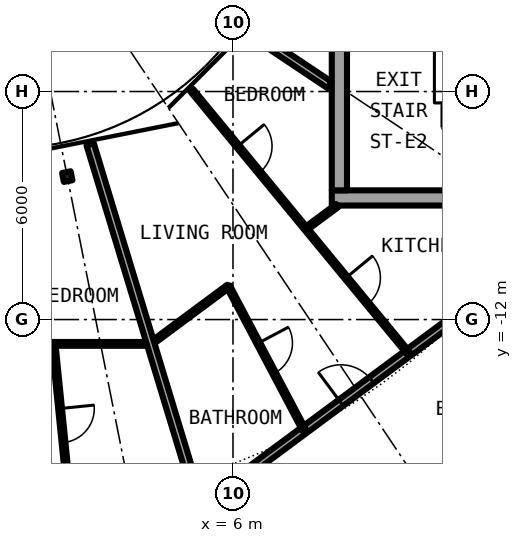
"""IFC4 building model, lengths in metres.
Left out: names, types, materials, properties, quantities, classifications, styles, units other than length and angle.
Written with IfcOpenShell. Run it as: python <this file> out.ifc"""

import sys

from ifc_helpers import new_model, si_unit, direction, frame, frame_2d, origin, origin_2d, place, context, subcontext, project, spatial, rectangle, i_section, extrude, element, fill, save


model = new_model("IFC4")
c1 = context("Model", 3, precision=1e-05, world=origin(), true_north=direction((0.0, 1.0)))
c2 = subcontext(c1, "Body", "Model", "MODEL_VIEW")
j1 = project(units=[si_unit("LENGTHUNIT", "METRE"), si_unit("PLANEANGLEUNIT", "RADIAN")], contexts=[c1])
p1 = place(None, origin())
s1 = spatial("IfcSite", under=j1, at=p1, CompositionType="ELEMENT")
p2 = place(p1, origin())
s2 = spatial("IfcBuilding", under=s1, at=p2, CompositionType="ELEMENT")
p3 = place(p2, frame((0.0, 0.0, 227.95)))
s3 = spatial("IfcBuildingStorey", under=s2, at=p3, CompositionType="ELEMENT", Elevation=227.95)
p4 = place(p3, frame((1.639, -8.239, 0.0), z_axis=(0.0, 0.0, 1.0), x_axis=(0.195090322016, -0.980785280403, 0.0)))
e1 = element("IfcColumn", 1, at=p4, inside=s3, PredefinedType="COLUMN", context=c2, shape_type="SweptSolid", body=[
    extrude(i_section(OverallWidth=0.24, OverallDepth=0.23, WebThickness=0.008, FlangeThickness=0.012, FilletRadius=0.021, at=origin_2d()), origin(), (0.0, 0.0, 1.0), 3.05),
])
p5 = place(p3, frame((8.6, -8.8, 0.0), z_axis=(0.0, 0.0, 1.0), x_axis=(1.0, 0.0, 0.0)))
e2 = element("IfcWall", 2, at=p5, inside=s3, PredefinedType="SHEAR", context=c2, shape_type="SweptSolid", body=[
    extrude(rectangle(XDim=13.4, YDim=0.4, at=frame_2d((6.7, 0.0))), origin(), (0.0, 0.0, 1.0), 3.05),
])
p6 = place(p5, frame((11.275, 0.0, 0.0)))
e3 = element("IfcOpeningElement", 3, at=p6, cuts=e2, PredefinedType="OPENING", context=c2, shape_type="SweptSolid", body=[
    extrude(rectangle(XDim=1.2, YDim=2.3, at=frame_2d((0.6, 1.15))), frame((0.0, 0.21, 0.0), z_axis=(0.0, -1.0, 0.0), x_axis=(1.0, 0.0, 0.0)), (0.0, 0.0, 1.0), 0.42),
])
p7 = place(p3, frame((8.8, -8.6, 0.0), z_axis=(0.0, 0.0, 1.0), x_axis=(0.0, 1.0, 0.0)))
e4 = element("IfcWall", 4, at=p7, inside=s3, PredefinedType="SHEAR", context=c2, shape_type="SweptSolid", body=[
    extrude(rectangle(XDim=17.2, YDim=0.4, at=frame_2d((8.6, 0.0))), origin(), (0.0, 0.0, 1.0), 3.05),
])
p8 = place(p7, frame((7.4, 0.0, 0.1)))
e5 = element("IfcOpeningElement", 5, at=p8, cuts=e4, PredefinedType="OPENING", context=c2, shape_type="SweptSolid", body=[
    extrude(rectangle(XDim=2.4, YDim=2.2, at=frame_2d((1.2, 1.1))), frame((0.0, 0.21, 0.0), z_axis=(0.0, -1.0, 0.0), x_axis=(1.0, 0.0, 0.0)), (0.0, 0.0, 1.0), 0.42),
])
p9 = place(p3, frame((10.512, -19.667, 0.0), z_axis=(0.0, 0.0, 1.0), x_axis=(0.740947367223, 0.671563101283, 0.0)))
e6 = element("IfcWall", 6, at=p9, inside=s3, PredefinedType="PARTITIONING", context=c2, shape_type="SweptSolid", body=[
    extrude(rectangle(XDim=10.837, YDim=0.2, at=frame_2d((5.419, 0.0))), origin(), (0.0, 0.0, 1.0), 2.7),
])
p10 = place(p9, frame((3.835, 0.0, 0.0)))
e7 = element("IfcOpeningElement", 7, at=p10, cuts=e6, PredefinedType="OPENING", context=c2, shape_type="SweptSolid", body=[
    extrude(rectangle(XDim=1.0, YDim=2.3, at=frame_2d((0.5, 1.15))), frame((0.0, 0.11, 0.0), z_axis=(0.0, -1.0, 0.0), x_axis=(1.0, 0.0, 0.0)), (0.0, 0.0, 1.0), 0.22),
])
p11 = place(p3, frame((5.137, -16.938, 0.0), z_axis=(0.0, 0.0, 1.0), x_axis=(0.803240181354, 0.595655278712, 0.0)))
e8 = element("IfcWall", 8, at=p11, inside=s3, PredefinedType="PARTITIONING", context=c2, shape_type="SweptSolid", body=[
    extrude(rectangle(XDim=11.928, YDim=0.2, at=frame_2d((5.964, 0.0))), origin(), (0.0, 0.0, 1.0), 2.7),
])
p12 = place(p11, frame((4.612, 0.0, 0.0)))
e9 = element("IfcOpeningElement", 9, at=p12, cuts=e8, PredefinedType="OPENING", context=c2, shape_type="SweptSolid", body=[
    extrude(rectangle(XDim=1.0, YDim=2.3, at=frame_2d((0.5, 1.15))), frame((0.0, 0.11, 0.0), z_axis=(0.0, -1.0, 0.0), x_axis=(1.0, 0.0, 0.0)), (0.0, 0.0, 1.0), 0.22),
])
p13 = place(p3, frame((0.0, -12.64, 0.0), z_axis=(0.0, 0.0, 1.0), x_axis=(1.0, 0.0, 0.0)))
e10 = element("IfcWall", 10, at=p13, inside=s3, PredefinedType="PARTITIONING", context=c2, shape_type="SweptSolid", body=[
    extrude(rectangle(XDim=3.834, YDim=0.1, at=frame_2d((1.917, 0.0))), origin(), (0.0, 0.0, 1.0), 2.7),
])
p14 = place(p3, frame((3.834, -12.64, 0.0), z_axis=(0.0, 0.0, 1.0), x_axis=(0.803259509791, 0.595629213463, 0.0)))
e11 = element("IfcWall", 11, at=p14, inside=s3, PredefinedType="PARTITIONING", context=c2, shape_type="SweptSolid", body=[
    extrude(rectangle(XDim=2.543, YDim=0.1, at=frame_2d((1.272, 0.0))), origin(), (0.0, 0.0, 1.0), 2.7),
])
p15 = place(p3, frame((7.919, -9.611, 0.0), z_axis=(0.0, 0.0, 1.0), x_axis=(0.80321556998, 0.595688465677, 0.0)))
e12 = element("IfcWall", 12, at=p15, inside=s3, PredefinedType="PARTITIONING", context=c2, shape_type="SweptSolid", body=[
    extrude(rectangle(XDim=1.026, YDim=0.1, at=frame_2d((0.513, 0.0))), origin(), (0.0, 0.0, 1.0), 2.7),
])
p16 = place(p3, frame((6.513, -4.472, 0.0), z_axis=(0.0, 0.0, 1.0), x_axis=(0.831450132577, -0.555599385382, 0.0)))
e13 = element("IfcWall", 13, at=p16, inside=s3, PredefinedType="PARTITIONING", context=c2, shape_type="SweptSolid", body=[
    extrude(rectangle(XDim=2.443, YDim=0.2, at=frame_2d((1.221, 0.0))), origin(), (0.0, 0.0, 1.0), 2.7),
])
p17 = place(p3, frame((1.278, -12.64, 0.0), z_axis=(0.0, 0.0, 1.0), x_axis=(0.100650711003, -0.994921823248, 0.0)))
e14 = element("IfcWall", 14, at=p17, inside=s3, PredefinedType="PARTITIONING", context=c2, shape_type="SweptSolid", body=[
    extrude(rectangle(XDim=4.32, YDim=0.1, at=frame_2d((2.16, 0.0))), origin(), (0.0, 0.0, 1.0), 2.7),
])
p18 = place(p17, frame((1.71, 0.0, 0.0)))
e15 = element("IfcOpeningElement", 15, at=p18, cuts=e14, PredefinedType="OPENING", context=c2, shape_type="SweptSolid", body=[
    extrude(rectangle(XDim=0.9, YDim=2.3, at=frame_2d((0.45, 1.15))), frame((0.0, 0.06, 0.0), z_axis=(0.0, -1.0, 0.0), x_axis=(1.0, 0.0, 0.0)), (0.0, 0.0, 1.0), 0.12),
])
p19 = place(p3, frame((2.241, -7.388, 0.0), z_axis=(0.0, 0.0, 1.0), x_axis=(0.290284403441, -0.956940418793, 0.0)))
e16 = element("IfcWall", 16, at=p19, inside=s3, PredefinedType="PARTITIONING", context=c2, shape_type="SweptSolid", body=[
    extrude(rectangle(XDim=9.98, YDim=0.2, at=frame_2d((4.99, 0.0))), origin(), (0.0, 0.0, 1.0), 2.7),
])
p20 = place(p3, frame((4.908, -5.959, 0.0), z_axis=(0.0, 0.0, 1.0), x_axis=(0.636115614725, -0.771593756262, 0.0)))
e17 = element("IfcWall", 17, at=p20, inside=s3, PredefinedType="PARTITIONING", context=c2, shape_type="SweptSolid", body=[
    extrude(rectangle(XDim=8.967, YDim=0.1, at=frame_2d((4.483, 0.0))), origin(), (0.0, 0.0, 1.0), 2.7),
])
p21 = place(p20, frame((6.4, 0.0, 0.0)))
e18 = element("IfcOpeningElement", 18, at=p21, cuts=e17, PredefinedType="OPENING", context=c2, shape_type="SweptSolid", body=[
    extrude(rectangle(XDim=0.9, YDim=2.3, at=frame_2d((0.45, 1.15))), frame((0.0, 0.06, 0.0), z_axis=(0.0, -1.0, 0.0), x_axis=(1.0, 0.0, 0.0)), (0.0, 0.0, 1.0), 0.12),
])
p22 = place(p20, frame((1.917, 0.0, 0.0)))
e19 = element("IfcOpeningElement", 19, at=p22, cuts=e17, PredefinedType="OPENING", context=c2, shape_type="SweptSolid", body=[
    extrude(rectangle(XDim=0.9, YDim=2.3, at=frame_2d((0.45, 1.15))), frame((0.0, 0.06, 0.0), z_axis=(0.0, -1.0, 0.0), x_axis=(1.0, 0.0, 0.0)), (0.0, 0.0, 1.0), 0.12),
])
p23 = place(p3, frame((5.876, -11.126, 0.0), z_axis=(0.0, 0.0, 1.0), x_axis=(0.467030118529, -0.884241408432, 0.0)))
e20 = element("IfcWall", 20, at=p23, inside=s3, PredefinedType="PARTITIONING", context=c2, shape_type="SweptSolid", body=[
    extrude(rectangle(XDim=4.278, YDim=0.1, at=frame_2d((2.139, 0.0))), origin(), (0.0, 0.0, 1.0), 2.7),
])
p24 = place(p23, frame((1.689, 0.0, 0.0)))
e21 = element("IfcOpeningElement", 21, at=p24, cuts=e20, PredefinedType="OPENING", context=c2, shape_type="SweptSolid", body=[
    extrude(rectangle(XDim=0.9, YDim=2.3, at=frame_2d((0.45, 1.15))), frame((0.0, 0.06, 0.0), z_axis=(0.0, -1.0, 0.0), x_axis=(1.0, 0.0, 0.0)), (0.0, 0.0, 1.0), 0.12),
])
p25 = place(p18, origin())
e22 = element("IfcDoor", 22, at=p25, inside=s3, OperationType="SINGLE_SWING_RIGHT", PredefinedType="DOOR", context=c2, shape_type="SweptSolid", body=[
    extrude(rectangle(XDim=0.9, YDim=2.3, at=frame_2d((0.45, 1.15))), frame((0.0, 0.025, 0.0), z_axis=(0.0, -1.0, 0.0), x_axis=(1.0, 0.0, 0.0)), (0.0, 0.0, 1.0), 0.05),
])
fill(e15, e22)
p26 = place(p12, origin())
e23 = element("IfcDoor", 23, at=p26, inside=s3, OperationType="SINGLE_SWING_LEFT", PredefinedType="DOOR", context=c2, shape_type="SweptSolid", body=[
    extrude(rectangle(XDim=1.0, YDim=2.3, at=frame_2d((0.5, 1.15))), frame((0.0, 0.025, 0.0), z_axis=(0.0, -1.0, 0.0), x_axis=(1.0, 0.0, 0.0)), (0.0, 0.0, 1.0), 0.05),
])
fill(e9, e23)
p27 = place(p24, origin())
e24 = element("IfcDoor", 24, at=p27, inside=s3, OperationType="SINGLE_SWING_LEFT", PredefinedType="DOOR", context=c2, shape_type="SweptSolid", body=[
    extrude(rectangle(XDim=0.9, YDim=2.3, at=frame_2d((0.45, 1.15))), frame((0.0, 0.025, 0.0), z_axis=(0.0, -1.0, 0.0), x_axis=(1.0, 0.0, 0.0)), (0.0, 0.0, 1.0), 0.05),
])
fill(e21, e24)
p28 = place(p21, origin())
e25 = element("IfcDoor", 25, at=p28, inside=s3, OperationType="SINGLE_SWING_RIGHT", PredefinedType="DOOR", context=c2, shape_type="SweptSolid", body=[
    extrude(rectangle(XDim=0.9, YDim=2.3, at=frame_2d((0.45, 1.15))), frame((0.0, 0.025, 0.0), z_axis=(0.0, -1.0, 0.0), x_axis=(1.0, 0.0, 0.0)), (0.0, 0.0, 1.0), 0.05),
])
fill(e18, e25)
p29 = place(p22, origin())
e26 = element("IfcDoor", 26, at=p29, inside=s3, OperationType="SINGLE_SWING_LEFT", PredefinedType="DOOR", context=c2, shape_type="SweptSolid", body=[
    extrude(rectangle(XDim=0.9, YDim=2.3, at=frame_2d((0.45, 1.15))), frame((0.0, 0.025, 0.0), z_axis=(0.0, -1.0, 0.0), x_axis=(1.0, 0.0, 0.0)), (0.0, 0.0, 1.0), 0.05),
])
fill(e19, e26)
save(model, sys.argv[1])
